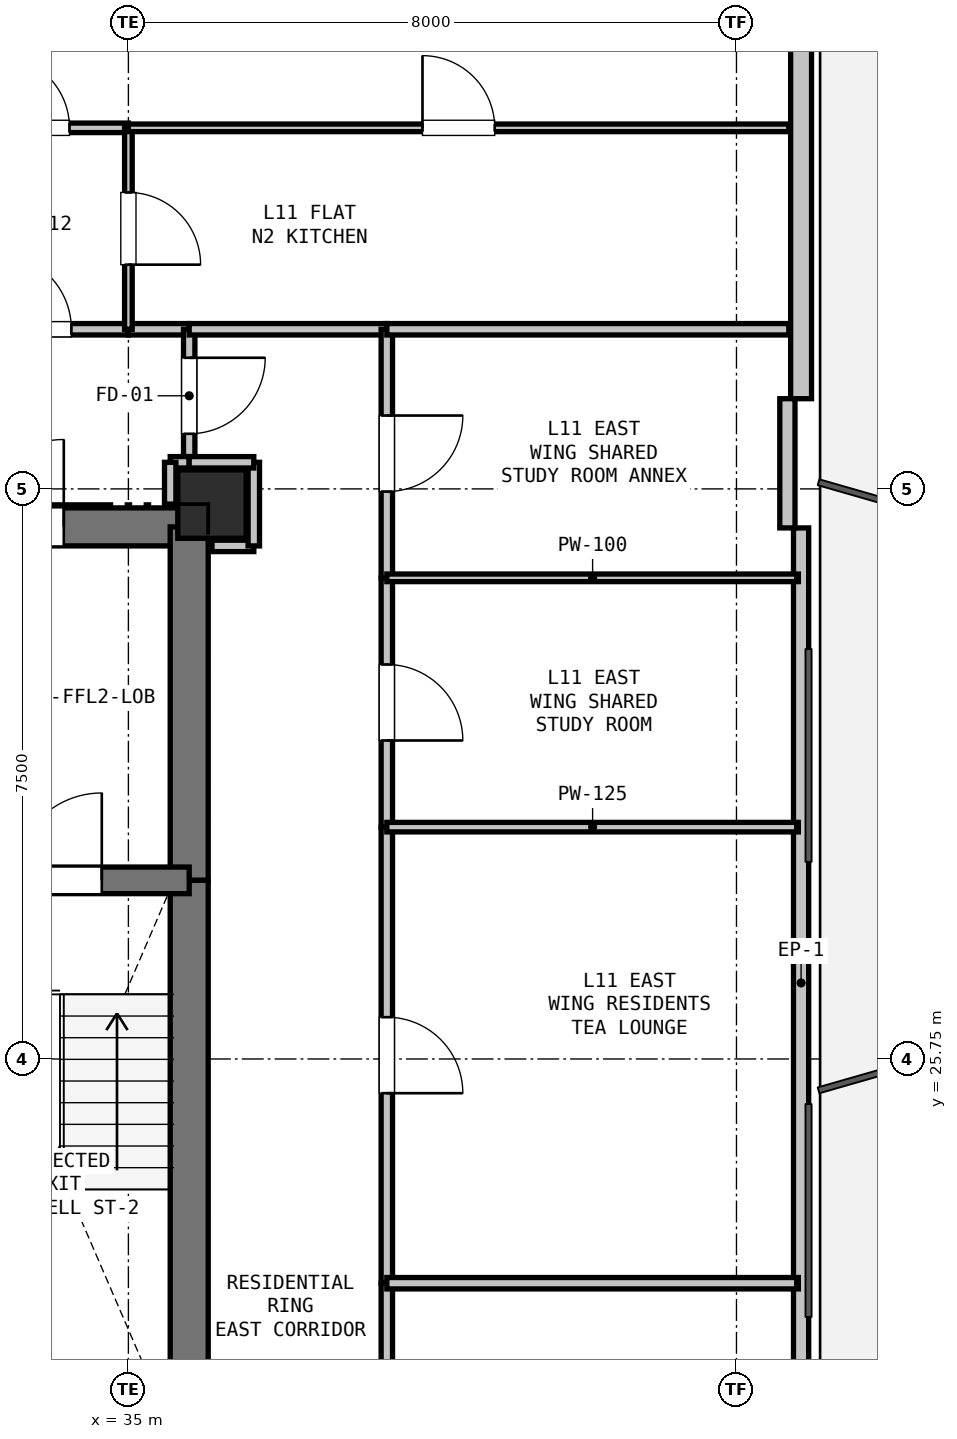
"""IFC4 building model, lengths in metres.
Left out: names, types, materials, properties, quantities, classifications, styles, units other than length and angle.
Written with IfcOpenShell. Run it as: python <this file> out.ifc"""

import sys

from ifc_helpers import new_model, si_unit, direction, frame, frame_2d, origin, origin_2d, place, context, subcontext, project, spatial, rectangle, extrude, element, fill, save


model = new_model("IFC4")
c1 = context("Model", 3, precision=1e-05, world=origin(), true_north=direction((0.0, 1.0)))
c2 = subcontext(c1, "Body", "Model", "MODEL_VIEW")
j1 = project(units=[si_unit("LENGTHUNIT", "METRE"), si_unit("PLANEANGLEUNIT", "RADIAN")], contexts=[c1])
p1 = place(None, origin())
s1 = spatial("IfcSite", under=j1, at=p1, CompositionType="ELEMENT")
p2 = place(p1, origin())
s2 = spatial("IfcBuilding", under=s1, at=p2, CompositionType="ELEMENT")
p3 = place(p2, frame((0.0, 0.0, 42.3)))
s3 = spatial("IfcBuildingStorey", under=s2, at=p3, CompositionType="ELEMENT", Elevation=42.3)
p4 = place(p3, frame((36.1, 33.05, 0.0), z_axis=(0.0, 0.0, 1.0), x_axis=(1.0, 0.0, 0.0)))
e1 = element("IfcColumn", 1, at=p4, inside=s3, PredefinedType="COLUMN", context=c2, shape_type="SweptSolid", body=[
    extrude(rectangle(XDim=0.9, YDim=0.9, at=origin_2d()), origin(), (0.0, 0.0, 1.0), 3.3),
])
p5 = place(p3, frame((43.85, 47.11, 0.0), z_axis=(0.0, 0.0, 1.0), x_axis=(0.0, -1.0, 0.0)))
e2 = element("IfcWall", 2, at=p5, inside=s3, PredefinedType="SOLIDWALL", context=c2, shape_type="SweptSolid", body=[
    extrude(rectangle(XDim=12.673, YDim=0.275, at=frame_2d((6.336, 0.0))), origin(), (0.0, 0.0, 1.0), 2.66),
])
p6 = place(p5, frame((2.325, 0.0, 0.0)))
e3 = element("IfcOpeningElement", 3, at=p6, cuts=e2, PredefinedType="OPENING", context=c2, shape_type="SweptSolid", body=[
    extrude(rectangle(XDim=1.1, YDim=2.1, at=frame_2d((0.55, 1.05))), frame((0.0, 0.147, 0.0), z_axis=(0.0, -1.0, 0.0), x_axis=(1.0, 0.0, 0.0)), (0.0, 0.0, 1.0), 0.295),
])
p7 = place(p3, frame((43.85, 32.737, 0.0), z_axis=(0.0, 0.0, 1.0), x_axis=(0.0, -1.0, 0.0)))
e4 = element("IfcWall", 4, at=p7, inside=s3, PredefinedType="PARAPET", context=c2, shape_type="SweptSolid", body=[
    extrude(rectangle(XDim=11.973, YDim=0.2, at=frame_2d((5.987, 0.0))), origin(), (0.0, 0.0, 1.0), 0.2),
])
p8 = place(p3, frame((43.67, 34.437, 0.0), z_axis=(0.0, 0.0, 1.0), x_axis=(0.0, -1.0, 0.0)))
e5 = element("IfcWall", 5, at=p8, inside=s3, PredefinedType="PARAPET", context=c2, shape_type="SweptSolid", body=[
    extrude(rectangle(XDim=1.7, YDim=0.2, at=frame_2d((0.85, 0.0))), origin(), (0.0, 0.0, 1.0), 2.66),
])
p9 = place(p3, frame((32.35, 32.75, 0.0), z_axis=(0.0, 0.0, 1.0), x_axis=(1.0, 0.0, 0.0)))
e6 = element("IfcWall", 6, at=p9, inside=s3, PredefinedType="SHEAR", context=c2, shape_type="SweptSolid", body=[
    extrude(rectangle(XDim=3.45, YDim=0.5, at=frame_2d((1.725, 0.0))), origin(), (0.0, 0.0, 1.0), 3.04),
])
p10 = place(p9, frame((0.65, 0.0, 0.0)))
e7 = element("IfcOpeningElement", 7, at=p10, cuts=e6, PredefinedType="OPENING", context=c2, shape_type="SweptSolid", body=[
    extrude(rectangle(XDim=1.15, YDim=2.15, at=frame_2d((0.575, 1.075))), frame((0.0, 0.26, 0.0), z_axis=(0.0, -1.0, 0.0), x_axis=(1.0, 0.0, 0.0)), (0.0, 0.0, 1.0), 0.52),
])
p11 = place(p3, frame((35.8, 32.75, 0.0), z_axis=(0.0, 0.0, 1.0), x_axis=(0.0, -1.0, 0.0)))
e8 = element("IfcWall", 8, at=p11, inside=s3, PredefinedType="SHEAR", context=c2, shape_type="SweptSolid", body=[
    extrude(rectangle(XDim=4.65, YDim=0.5, at=frame_2d((2.325, 0.0))), origin(), (0.0, 0.0, 1.0), 3.04),
])
p12 = place(p3, frame((35.8, 28.1, 0.0), z_axis=(0.0, 0.0, 1.0), x_axis=(0.0, -1.0, 0.0)))
e9 = element("IfcWall", 9, at=p12, inside=s3, PredefinedType="SHEAR", context=c2, shape_type="SweptSolid", body=[
    extrude(rectangle(XDim=7.35, YDim=0.5, at=frame_2d((3.675, 0.0))), origin(), (0.0, 0.0, 1.0), 3.04),
])
p13 = place(p3, frame((32.35, 28.1, 0.0), z_axis=(0.0, 0.0, 1.0), x_axis=(1.0, 0.0, 0.0)))
e10 = element("IfcWall", 10, at=p13, inside=s3, PredefinedType="SHEAR", context=c2, shape_type="SweptSolid", body=[
    extrude(rectangle(XDim=3.45, YDim=0.35, at=frame_2d((1.725, 0.0))), origin(), (0.0, 0.0, 1.0), 3.04),
])
p14 = place(p13, frame((1.15, 0.0, 0.0)))
e11 = element("IfcOpeningElement", 11, at=p14, cuts=e10, PredefinedType="OPENING", context=c2, shape_type="SweptSolid", body=[
    extrude(rectangle(XDim=1.15, YDim=2.15, at=frame_2d((0.575, 1.075))), frame((0.0, 0.185, 0.0), z_axis=(0.0, -1.0, 0.0), x_axis=(1.0, 0.0, 0.0)), (0.0, 0.0, 1.0), 0.37),
])
p15 = place(p3, frame((32.5, 35.35, 0.0), z_axis=(0.0, 0.0, 1.0), x_axis=(1.0, 0.0, 0.0)))
e12 = element("IfcWall", 12, at=p15, inside=s3, PredefinedType="PARTITIONING", context=c2, shape_type="SweptSolid", body=[
    extrude(rectangle(XDim=2.5, YDim=0.15, at=frame_2d((1.25, 0.0))), origin(), (0.0, 0.0, 1.0), 3.04),
])
p16 = place(p15, frame((0.75, 0.0, 0.0)))
e13 = element("IfcOpeningElement", 13, at=p16, cuts=e12, PredefinedType="OPENING", context=c2, shape_type="SweptSolid", body=[
    extrude(rectangle(XDim=1.0, YDim=2.15, at=frame_2d((0.5, 1.075))), frame((0.0, 0.085, 0.0), z_axis=(0.0, -1.0, 0.0), x_axis=(1.0, 0.0, 0.0)), (0.0, 0.0, 1.0), 0.17),
])
p17 = place(p3, frame((35.0, 35.35, 0.0), z_axis=(0.0, 0.0, 1.0), x_axis=(1.0, 0.0, 0.0)))
e14 = element("IfcWall", 14, at=p17, inside=s3, PredefinedType="PARTITIONING", context=c2, shape_type="SweptSolid", body=[
    extrude(rectangle(XDim=0.8, YDim=0.15, at=frame_2d((0.4, 0.0))), origin(), (0.0, 0.0, 1.0), 3.04),
])
p18 = place(p3, frame((35.8, 35.35, 0.0), z_axis=(0.0, 0.0, 1.0), x_axis=(0.0, -1.0, 0.0)))
e15 = element("IfcWall", 15, at=p18, inside=s3, PredefinedType="PARTITIONING", context=c2, shape_type="SweptSolid", body=[
    extrude(rectangle(XDim=1.75, YDim=0.15, at=frame_2d((0.875, 0.0))), origin(), (0.0, 0.0, 1.0), 3.04),
])
p19 = place(p18, frame((0.375, 0.0, 0.0)))
e16 = element("IfcOpeningElement", 16, at=p19, cuts=e15, PredefinedType="OPENING", context=c2, shape_type="SweptSolid", body=[
    extrude(rectangle(XDim=1.0, YDim=2.15, at=frame_2d((0.5, 1.075))), frame((0.0, 0.085, 0.0), z_axis=(0.0, -1.0, 0.0), x_axis=(1.0, 0.0, 0.0)), (0.0, 0.0, 1.0), 0.17),
])
p20 = place(p3, frame((35.8, 33.6, 0.0), z_axis=(0.0, 0.0, 1.0), x_axis=(-1.0, 0.0, 0.0)))
e17 = element("IfcWall", 17, at=p20, inside=s3, PredefinedType="PARTITIONING", context=c2, shape_type="SweptSolid", body=[
    extrude(rectangle(XDim=0.25, YDim=0.15, at=frame_2d((0.125, 0.0))), origin(), (0.0, 0.0, 1.0), 3.04),
])
p21 = place(p3, frame((35.55, 33.6, 0.0), z_axis=(0.0, 0.0, 1.0), x_axis=(0.0, -1.0, 0.0)))
e18 = element("IfcWall", 18, at=p21, inside=s3, PredefinedType="PARTITIONING", context=c2, shape_type="SweptSolid", body=[
    extrude(rectangle(XDim=0.55, YDim=0.15, at=frame_2d((0.275, 0.0))), origin(), (0.0, 0.0, 1.0), 2.488),
])
p22 = place(p3, frame((36.1, 32.5, 0.0), z_axis=(0.0, 0.0, 1.0), x_axis=(1.0, 0.0, 0.0)))
e19 = element("IfcWall", 19, at=p22, inside=s3, PredefinedType="PARTITIONING", context=c2, shape_type="SweptSolid", body=[
    extrude(rectangle(XDim=0.55, YDim=0.15, at=frame_2d((0.275, 0.0))), origin(), (0.0, 0.0, 1.0), 2.488),
])
p23 = place(p3, frame((36.65, 32.5, 0.0), z_axis=(0.0, 0.0, 1.0), x_axis=(0.0, 1.0, 0.0)))
e20 = element("IfcWall", 20, at=p23, inside=s3, PredefinedType="PARTITIONING", context=c2, shape_type="SweptSolid", body=[
    extrude(rectangle(XDim=1.1, YDim=0.15, at=frame_2d((0.55, 0.0))), origin(), (0.0, 0.0, 1.0), 2.337),
])
p24 = place(p3, frame((36.65, 33.6, 0.0), z_axis=(0.0, 0.0, 1.0), x_axis=(-1.0, 0.0, 0.0)))
e21 = element("IfcWall", 21, at=p24, inside=s3, PredefinedType="PARTITIONING", context=c2, shape_type="SweptSolid", body=[
    extrude(rectangle(XDim=0.85, YDim=0.15, at=frame_2d((0.425, 0.0))), origin(), (0.0, 0.0, 1.0), 2.337),
])
p25 = place(p3, frame((35.8, 35.35, 0.0), z_axis=(0.0, 0.0, 1.0), x_axis=(1.0, 0.0, 0.0)))
e22 = element("IfcWall", 22, at=p25, inside=s3, PredefinedType="PARTITIONING", context=c2, shape_type="SweptSolid", body=[
    extrude(rectangle(XDim=2.6, YDim=0.15, at=frame_2d((1.3, 0.0))), origin(), (0.0, 0.0, 1.0), 2.337),
])
p26 = place(p3, frame((38.4, 35.35, 0.0), z_axis=(0.0, 0.0, 1.0), x_axis=(0.0, -1.0, 0.0)))
e23 = element("IfcWall", 23, at=p26, inside=s3, PredefinedType="PARTITIONING", context=c2, shape_type="SweptSolid", body=[
    extrude(rectangle(XDim=3.27, YDim=0.15, at=frame_2d((1.635, 0.0))), origin(), (0.0, 0.0, 1.0), 2.337),
])
p27 = place(p26, frame((1.135, 0.0, 0.0)))
e24 = element("IfcOpeningElement", 24, at=p27, cuts=e23, PredefinedType="OPENING", context=c2, shape_type="SweptSolid", body=[
    extrude(rectangle(XDim=1.0, YDim=2.15, at=frame_2d((0.5, 1.075))), frame((0.0, 0.085, 0.0), z_axis=(0.0, -1.0, 0.0), x_axis=(1.0, 0.0, 0.0)), (0.0, 0.0, 1.0), 0.17),
])
p28 = place(p3, frame((38.4, 32.08, 0.0), z_axis=(0.0, 0.0, 1.0), x_axis=(0.0, -1.0, 0.0)))
e25 = element("IfcWall", 25, at=p28, inside=s3, PredefinedType="PARTITIONING", context=c2, shape_type="SweptSolid", body=[
    extrude(rectangle(XDim=3.28, YDim=0.15, at=frame_2d((1.64, 0.0))), origin(), (0.0, 0.0, 1.0), 3.04),
])
p29 = place(p28, frame((1.14, 0.0, 0.0)))
e26 = element("IfcOpeningElement", 26, at=p29, cuts=e25, PredefinedType="OPENING", context=c2, shape_type="SweptSolid", body=[
    extrude(rectangle(XDim=1.0, YDim=2.15, at=frame_2d((0.5, 1.075))), frame((0.0, 0.085, 0.0), z_axis=(0.0, -1.0, 0.0), x_axis=(1.0, 0.0, 0.0)), (0.0, 0.0, 1.0), 0.17),
])
p30 = place(p3, frame((38.4, 28.8, 0.0), z_axis=(0.0, 0.0, 1.0), x_axis=(0.0, -1.0, 0.0)))
e27 = element("IfcWall", 27, at=p30, inside=s3, PredefinedType="PARTITIONING", context=c2, shape_type="SweptSolid", body=[
    extrude(rectangle(XDim=6.0, YDim=0.15, at=frame_2d((3.0, 0.0))), origin(), (0.0, 0.0, 1.0), 3.04),
])
p31 = place(p30, frame((2.5, 0.0, 0.0)))
e28 = element("IfcOpeningElement", 28, at=p31, cuts=e27, PredefinedType="OPENING", context=c2, shape_type="SweptSolid", body=[
    extrude(rectangle(XDim=1.0, YDim=2.15, at=frame_2d((0.5, 1.075))), frame((0.0, 0.085, 0.0), z_axis=(0.0, -1.0, 0.0), x_axis=(1.0, 0.0, 0.0)), (0.0, 0.0, 1.0), 0.17),
])
p32 = place(p3, frame((38.4, 22.8, 0.0), z_axis=(0.0, 0.0, 1.0), x_axis=(0.0, -1.0, 0.0)))
e29 = element("IfcWall", 29, at=p32, inside=s3, PredefinedType="PARTITIONING", context=c2, shape_type="SweptSolid", body=[
    extrude(rectangle(XDim=4.65, YDim=0.15, at=frame_2d((2.325, 0.0))), origin(), (0.0, 0.0, 1.0), 3.04),
])
p33 = place(p32, frame((1.9, 0.0, 0.0)))
e30 = element("IfcOpeningElement", 30, at=p33, cuts=e29, PredefinedType="OPENING", context=c2, shape_type="SweptSolid", body=[
    extrude(rectangle(XDim=0.85, YDim=2.1, at=frame_2d((0.425, 1.05))), frame((0.0, 0.085, 0.0), z_axis=(0.0, -1.0, 0.0), x_axis=(1.0, 0.0, 0.0)), (0.0, 0.0, 1.0), 0.17),
])
p34 = place(p3, frame((32.5, 38.0, 0.0), z_axis=(0.0, 0.0, 1.0), x_axis=(1.0, 0.0, 0.0)))
e31 = element("IfcWall", 31, at=p34, inside=s3, PredefinedType="PARTITIONING", context=c2, shape_type="SweptSolid", body=[
    extrude(rectangle(XDim=2.5, YDim=0.125, at=frame_2d((1.25, 0.0))), origin(), (0.0, 0.0, 1.0), 3.04),
])
p35 = place(p34, frame((0.775, 0.0, 0.0)))
e32 = element("IfcOpeningElement", 32, at=p35, cuts=e31, PredefinedType="OPENING", context=c2, shape_type="SweptSolid", body=[
    extrude(rectangle(XDim=0.95, YDim=2.1, at=frame_2d((0.475, 1.05))), frame((0.0, 0.073, 0.0), z_axis=(0.0, -1.0, 0.0), x_axis=(1.0, 0.0, 0.0)), (0.0, 0.0, 1.0), 0.145),
])
p36 = place(p3, frame((35.0, 38.0, 0.0), z_axis=(0.0, 0.0, 1.0), x_axis=(0.0, -1.0, 0.0)))
e33 = element("IfcWall", 33, at=p36, inside=s3, PredefinedType="PARTITIONING", context=c2, shape_type="SweptSolid", body=[
    extrude(rectangle(XDim=2.65, YDim=0.1, at=frame_2d((1.325, 0.0))), origin(), (0.0, 0.0, 1.0), 3.04),
])
p37 = place(p36, frame((0.85, 0.0, 0.0)))
e34 = element("IfcOpeningElement", 34, at=p37, cuts=e33, PredefinedType="OPENING", context=c2, shape_type="SweptSolid", body=[
    extrude(rectangle(XDim=0.95, YDim=2.1, at=frame_2d((0.475, 1.05))), frame((0.0, 0.06, 0.0), z_axis=(0.0, -1.0, 0.0), x_axis=(1.0, 0.0, 0.0)), (0.0, 0.0, 1.0), 0.12),
])
p38 = place(p3, frame((43.688, 35.35, 0.0), z_axis=(0.0, 0.0, 1.0), x_axis=(-1.0, 0.0, 0.0)))
e35 = element("IfcWall", 35, at=p38, inside=s3, PredefinedType="PARTITIONING", context=c2, shape_type="SweptSolid", body=[
    extrude(rectangle(XDim=5.289, YDim=0.15, at=frame_2d((2.644, 0.0))), origin(), (0.0, 0.0, 1.0), 2.337),
])
p39 = place(p3, frame((35.0, 38.0, 0.0), z_axis=(0.0, 0.0, 1.0), x_axis=(1.0, 0.0, 0.0)))
e36 = element("IfcWall", 36, at=p39, inside=s3, PredefinedType="PARTITIONING", context=c2, shape_type="SweptSolid", body=[
    extrude(rectangle(XDim=8.688, YDim=0.1, at=frame_2d((4.344, 0.0))), origin(), (0.0, 0.0, 1.0), 2.337),
])
p40 = place(p39, frame((3.869, 0.0, 0.0)))
e37 = element("IfcOpeningElement", 37, at=p40, cuts=e36, PredefinedType="OPENING", context=c2, shape_type="SweptSolid", body=[
    extrude(rectangle(XDim=0.95, YDim=2.1, at=frame_2d((0.475, 1.05))), frame((0.0, 0.06, 0.0), z_axis=(0.0, -1.0, 0.0), x_axis=(1.0, 0.0, 0.0)), (0.0, 0.0, 1.0), 0.12),
])
p41 = place(p3, frame((38.4, 32.08, 0.0), z_axis=(0.0, 0.0, 1.0), x_axis=(1.0, 0.0, 0.0)))
e38 = element("IfcWall", 38, at=p41, inside=s3, PredefinedType="PARTITIONING", context=c2, shape_type="SweptSolid", body=[
    extrude(rectangle(XDim=5.414, YDim=0.1, at=frame_2d((2.707, 0.0))), origin(), (0.0, 0.0, 1.0), 2.365),
])
p42 = place(p3, frame((43.814, 28.8, 0.0), z_axis=(0.0, 0.0, 1.0), x_axis=(-1.0, 0.0, 0.0)))
e39 = element("IfcWall", 39, at=p42, inside=s3, PredefinedType="PARTITIONING", context=c2, shape_type="SweptSolid", body=[
    extrude(rectangle(XDim=5.414, YDim=0.125, at=frame_2d((2.707, 0.0))), origin(), (0.0, 0.0, 1.0), 2.365),
])
p43 = place(p3, frame((43.814, 22.8, 0.0), z_axis=(0.0, 0.0, 1.0), x_axis=(-1.0, 0.0, 0.0)))
e40 = element("IfcWall", 40, at=p43, inside=s3, PredefinedType="PARTITIONING", context=c2, shape_type="SweptSolid", body=[
    extrude(rectangle(XDim=5.414, YDim=0.15, at=frame_2d((2.707, 0.0))), origin(), (0.0, 0.0, 1.0), 2.365),
])
p44 = place(p14, origin())
e41 = element("IfcDoor", 41, at=p44, inside=s3, OperationType="SINGLE_SWING_RIGHT", PredefinedType="DOOR", context=c2, shape_type="SweptSolid", body=[
    extrude(rectangle(XDim=1.15, YDim=2.15, at=frame_2d((0.575, 1.075))), frame((0.0, 0.025, 0.0), z_axis=(0.0, -1.0, 0.0), x_axis=(1.0, 0.0, 0.0)), (0.0, 0.0, 1.0), 0.05),
])
fill(e11, e41)
p45 = place(p10, origin())
e42 = element("IfcDoor", 42, at=p45, inside=s3, OperationType="SINGLE_SWING_RIGHT", PredefinedType="DOOR", context=c2, shape_type="SweptSolid", body=[
    extrude(rectangle(XDim=1.15, YDim=2.15, at=frame_2d((0.575, 1.075))), frame((0.0, 0.025, 0.0), z_axis=(0.0, -1.0, 0.0), x_axis=(1.0, 0.0, 0.0)), (0.0, 0.0, 1.0), 0.05),
])
fill(e7, e42)
p46 = place(p19, origin())
e43 = element("IfcDoor", 43, at=p46, inside=s3, OperationType="SINGLE_SWING_LEFT", PredefinedType="DOOR", context=c2, shape_type="SweptSolid", body=[
    extrude(rectangle(XDim=1.0, YDim=2.15, at=frame_2d((0.5, 1.075))), frame((0.0, 0.025, 0.0), z_axis=(0.0, -1.0, 0.0), x_axis=(1.0, 0.0, 0.0)), (0.0, 0.0, 1.0), 0.05),
])
fill(e16, e43)
p47 = place(p16, origin())
e44 = element("IfcDoor", 44, at=p47, inside=s3, OperationType="SINGLE_SWING_LEFT", PredefinedType="DOOR", context=c2, shape_type="SweptSolid", body=[
    extrude(rectangle(XDim=1.0, YDim=2.15, at=frame_2d((0.5, 1.075))), frame((0.0, 0.025, 0.0), z_axis=(0.0, -1.0, 0.0), x_axis=(1.0, 0.0, 0.0)), (0.0, 0.0, 1.0), 0.05),
])
fill(e13, e44)
p48 = place(p29, origin())
e45 = element("IfcDoor", 45, at=p48, inside=s3, OperationType="SINGLE_SWING_RIGHT", PredefinedType="DOOR", context=c2, shape_type="SweptSolid", body=[
    extrude(rectangle(XDim=1.0, YDim=2.15, at=frame_2d((0.5, 1.075))), frame((0.0, 0.025, 0.0), z_axis=(0.0, -1.0, 0.0), x_axis=(1.0, 0.0, 0.0)), (0.0, 0.0, 1.0), 0.05),
])
fill(e26, e45)
p49 = place(p27, origin())
e46 = element("IfcDoor", 46, at=p49, inside=s3, OperationType="SINGLE_SWING_LEFT", PredefinedType="DOOR", context=c2, shape_type="SweptSolid", body=[
    extrude(rectangle(XDim=1.0, YDim=2.15, at=frame_2d((0.5, 1.075))), frame((0.0, 0.025, 0.0), z_axis=(0.0, -1.0, 0.0), x_axis=(1.0, 0.0, 0.0)), (0.0, 0.0, 1.0), 0.05),
])
fill(e24, e46)
p50 = place(p31, origin())
e47 = element("IfcDoor", 47, at=p50, inside=s3, OperationType="SINGLE_SWING_RIGHT", PredefinedType="DOOR", context=c2, shape_type="SweptSolid", body=[
    extrude(rectangle(XDim=1.0, YDim=2.15, at=frame_2d((0.5, 1.075))), frame((0.0, 0.025, 0.0), z_axis=(0.0, -1.0, 0.0), x_axis=(1.0, 0.0, 0.0)), (0.0, 0.0, 1.0), 0.05),
])
fill(e28, e47)
p51 = place(p37, origin())
e48 = element("IfcDoor", 48, at=p51, inside=s3, OperationType="SINGLE_SWING_RIGHT", PredefinedType="DOOR", context=c2, shape_type="SweptSolid", body=[
    extrude(rectangle(XDim=0.95, YDim=2.1, at=frame_2d((0.475, 1.05))), frame((0.0, 0.025, 0.0), z_axis=(0.0, -1.0, 0.0), x_axis=(1.0, 0.0, 0.0)), (0.0, 0.0, 1.0), 0.05),
])
fill(e34, e48)
p52 = place(p35, origin())
e49 = element("IfcDoor", 49, at=p52, inside=s3, OperationType="SINGLE_SWING_LEFT", PredefinedType="DOOR", context=c2, shape_type="SweptSolid", body=[
    extrude(rectangle(XDim=0.95, YDim=2.1, at=frame_2d((0.475, 1.05))), frame((0.0, 0.025, 0.0), z_axis=(0.0, -1.0, 0.0), x_axis=(1.0, 0.0, 0.0)), (0.0, 0.0, 1.0), 0.05),
])
fill(e32, e49)
p53 = place(p40, origin())
e50 = element("IfcDoor", 50, at=p53, inside=s3, OperationType="SINGLE_SWING_LEFT", PredefinedType="DOOR", context=c2, shape_type="SweptSolid", body=[
    extrude(rectangle(XDim=0.95, YDim=2.1, at=frame_2d((0.475, 1.05))), frame((0.0, 0.025, 0.0), z_axis=(0.0, -1.0, 0.0), x_axis=(1.0, 0.0, 0.0)), (0.0, 0.0, 1.0), 0.05),
])
fill(e37, e50)
save(model, sys.argv[1])
